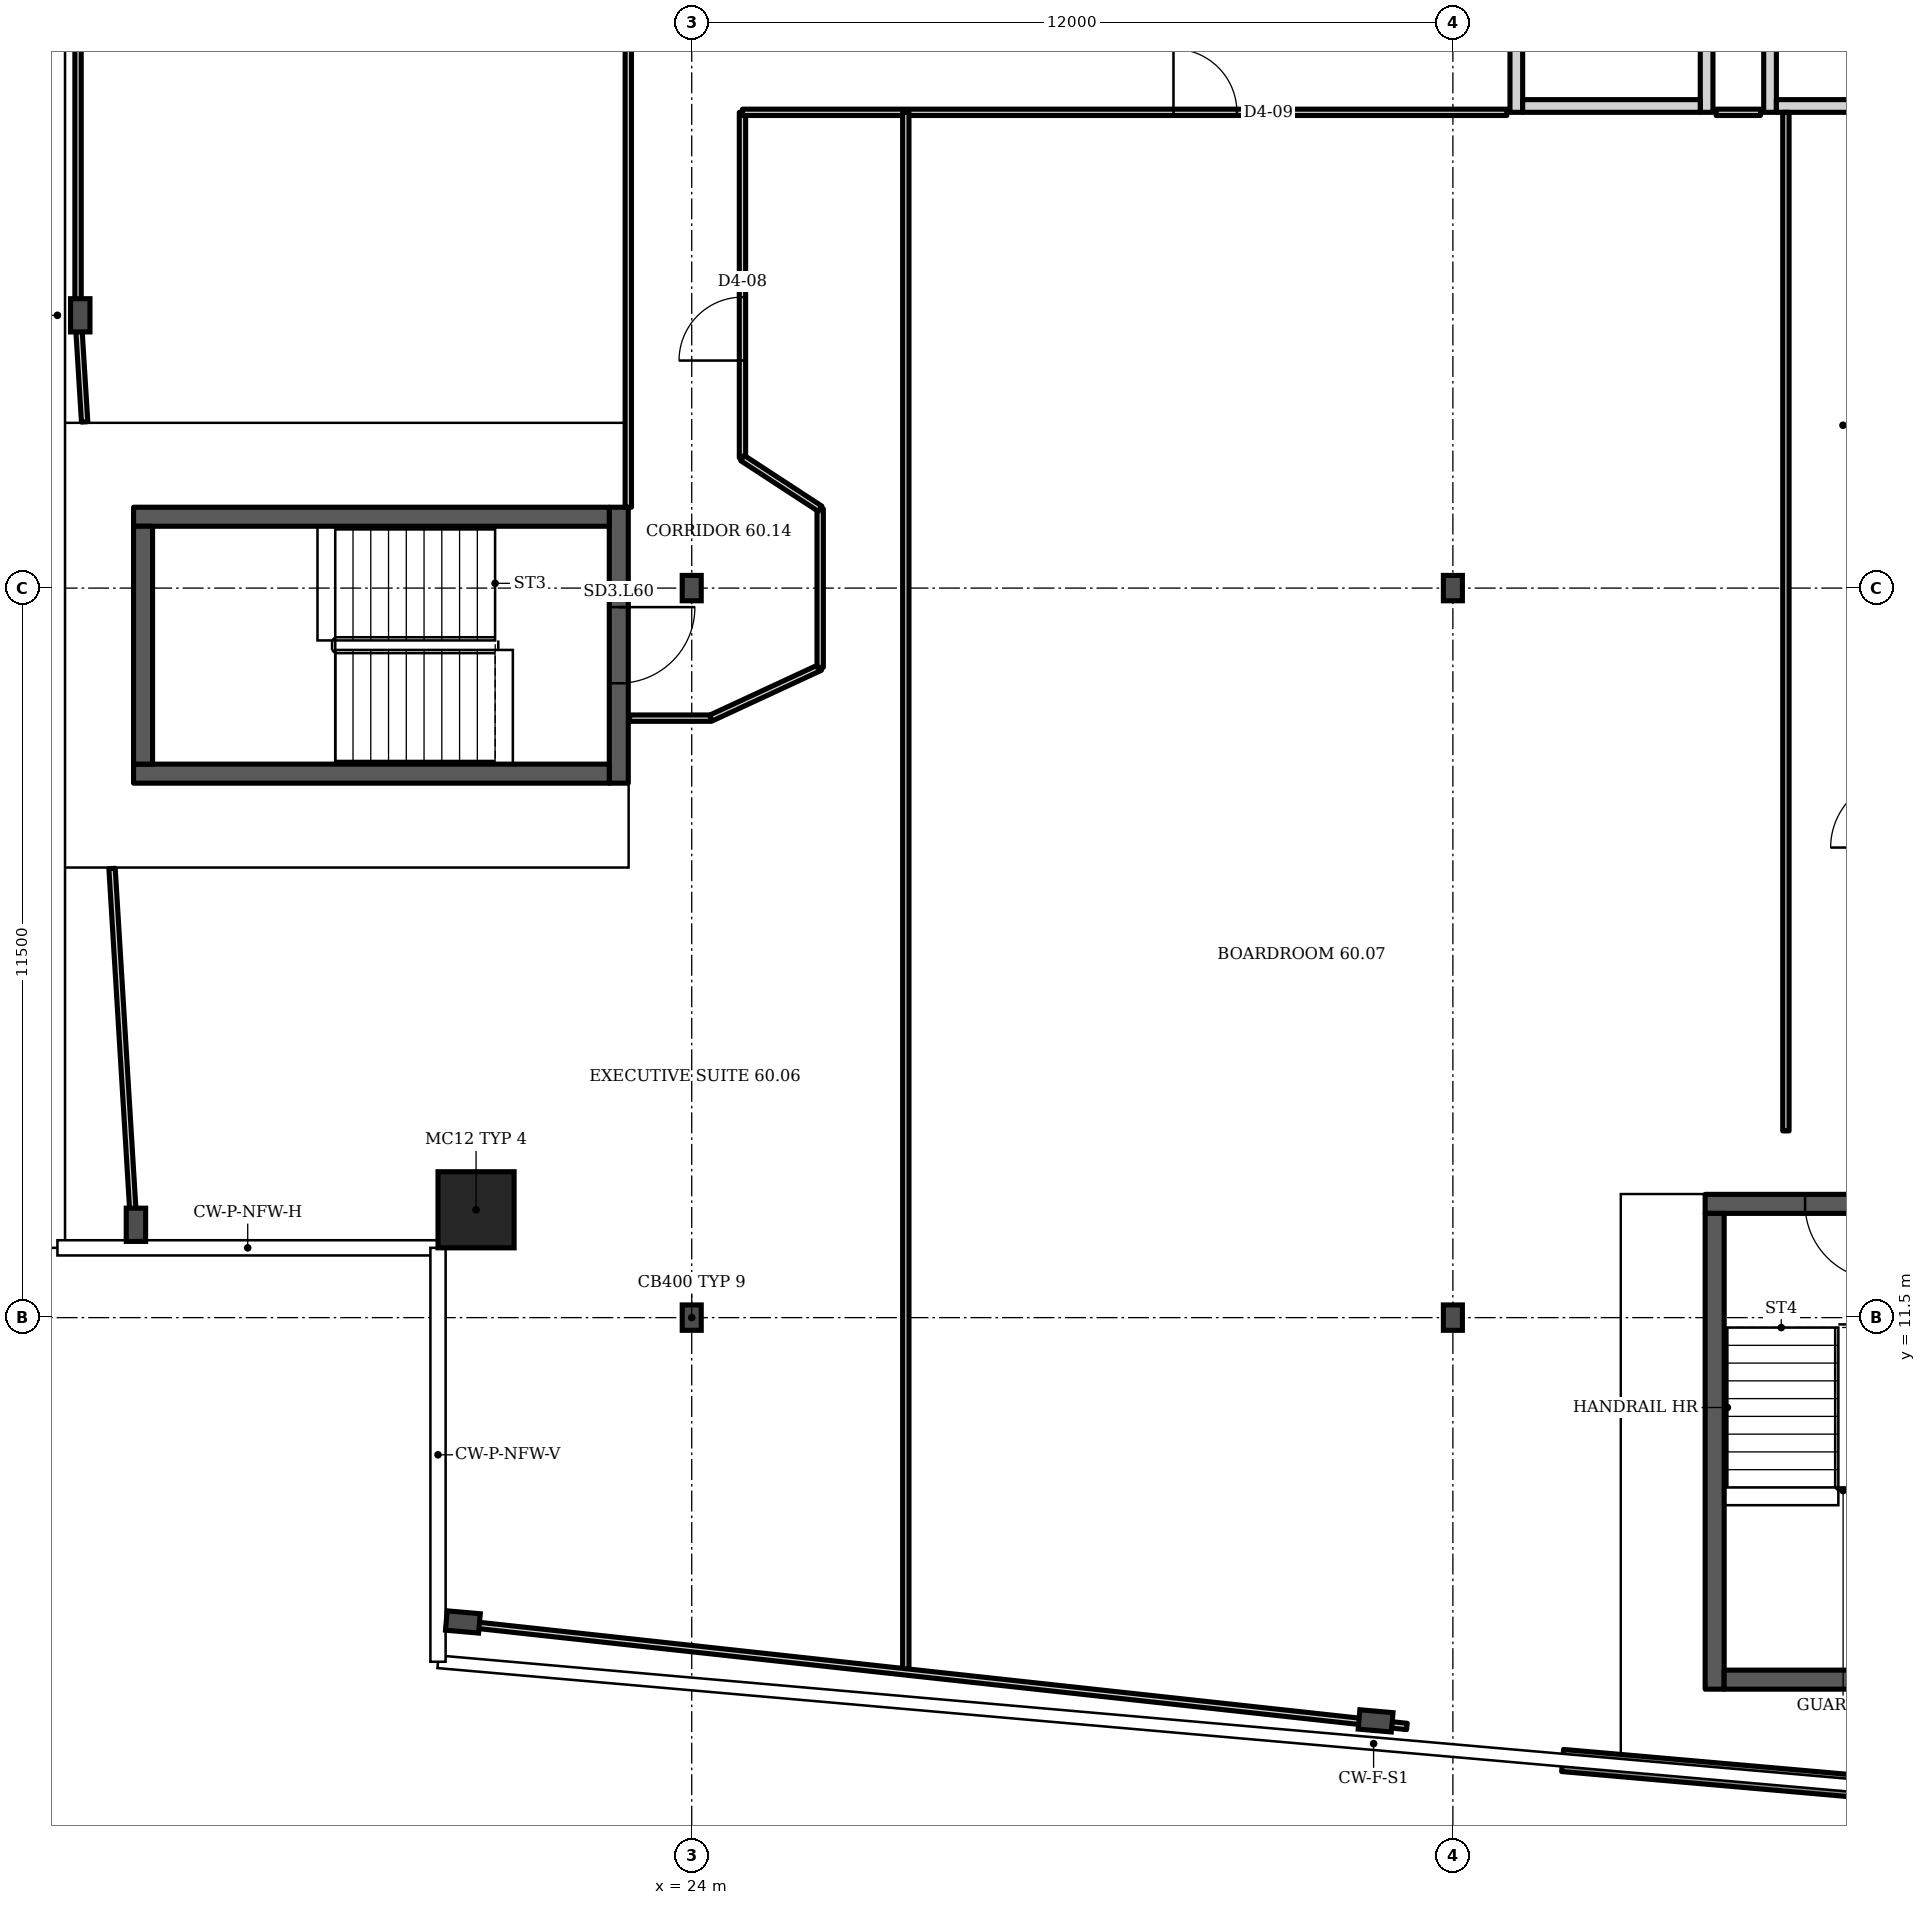
"""IFC4 building model, lengths in metres.
Left out: names, types, materials, properties, quantities, classifications, styles, units other than length and angle.
Written with IfcOpenShell. Run it as: python <this file> out.ifc"""

import sys

from ifc_helpers import new_model, si_unit, direction, frame, frame_2d, origin, origin_2d, place, context, subcontext, project, spatial, rectangle, i_section, extrude, element, fill, save


model = new_model("IFC4")
c1 = context("Model", 3, precision=1e-05, world=origin(), true_north=direction((0.0, 1.0)))
c2 = subcontext(c1, "Body", "Model", "MODEL_VIEW")
j1 = project(units=[si_unit("LENGTHUNIT", "METRE"), si_unit("PLANEANGLEUNIT", "RADIAN")], contexts=[c1])
p1 = place(None, origin())
s1 = spatial("IfcSite", under=j1, at=p1, CompositionType="ELEMENT")
p2 = place(p1, origin())
s2 = spatial("IfcBuilding", under=s1, at=p2, CompositionType="ELEMENT")
p3 = place(p2, frame((0.0, 0.0, 239.5)))
s3 = spatial("IfcBuildingStorey", under=s2, at=p3, CompositionType="ELEMENT", Elevation=239.5)
p4 = place(p3, frame((20.6, 13.2, 0.0), z_axis=(0.0, 0.0, 1.0), x_axis=(1.0, 0.0, 0.0)))
e1 = element("IfcColumn", 1, at=p4, inside=s3, PredefinedType="COLUMN", context=c2, shape_type="SweptSolid", body=[
    extrude(rectangle(XDim=1.2, YDim=1.2, at=origin_2d()), origin(), (0.0, 0.0, 1.0), 3.6),
])
for number, where, z_axis, x_axis in (
    (2, (20.392, 6.703, 0.0), (0.0, 0.0, 1.0), (-0.087, -0.996, 0.0)),
    (3, (34.781, 5.143, 0.0), (0.0, 0.0, 1.0), (-0.087, -0.996, 0.0)),
    (4, (14.36, 27.3, 0.0), (0.0, 0.0, 1.0), (-1.0, 0.0, 0.0)),
    (5, (15.238, 12.963, 0.0), (0.0, 0.0, 1.0), (-1.0, 0.0, 0.0)),
):
    element("IfcColumn", number, at=place(p3, frame(where, z_axis=z_axis, x_axis=x_axis)), inside=s3, PredefinedType="COLUMN", context=c2, shape_type="SweptSolid", body=[
        extrude(i_section(OverallWidth=0.306, OverallDepth=0.524, WebThickness=0.021, FlangeThickness=0.04, FilletRadius=0.027, at=origin_2d()), origin(), (0.0, 0.0, 1.0), 3.6),
    ])
for number, where, z_axis, x_axis in (
    (6, (24.0, 11.5, 0.0), (0.0, 0.0, 1.0), (1.0, 0.0, 0.0)),
    (7, (36.0, 11.5, 0.0), (0.0, 0.0, 1.0), (1.0, 0.0, 0.0)),
    (8, (24.0, 23.0, 0.0), (0.0, 0.0, 1.0), (1.0, 0.0, 0.0)),
    (9, (36.0, 23.0, 0.0), (0.0, 0.0, 1.0), (1.0, 0.0, 0.0)),
):
    element("IfcColumn", number, at=place(p3, frame(where, z_axis=z_axis, x_axis=x_axis)), inside=s3, PredefinedType="COLUMN", context=c2, shape_type="SweptSolid", body=[
        extrude(i_section(OverallWidth=0.3, OverallDepth=0.4, WebThickness=0.013, FlangeThickness=0.024, FilletRadius=0.027, at=origin_2d()), origin(), (0.0, 0.0, 1.0), 3.6),
    ])
p5 = place(p3, frame((37.729, 4.519, 0.0), z_axis=(0.0, 0.0, 1.0), x_axis=(0.99619, -0.087167, 0.0)))
e10 = element("IfcWall", 10, at=p5, inside=s3, PredefinedType="SOLIDWALL", context=c2, shape_type="SweptSolid", body=[
    extrude(rectangle(XDim=11.831, YDim=0.35, at=frame_2d((5.915, 0.0))), origin(), (0.0, 0.0, 1.0), 1.0),
])
p6 = place(p3, frame((37.0, 30.5, 0.0), z_axis=(0.0, 0.0, 1.0), x_axis=(0.0, 1.0, 0.0)))
e11 = element("IfcWall", 11, at=p6, inside=s3, PredefinedType="PARTITIONING", context=c2, shape_type="SweptSolid", body=[
    extrude(rectangle(XDim=3.5, YDim=0.2, at=frame_2d((1.75, 0.0))), origin(), (0.0, 0.0, 1.0), 3.2),
])
p7 = place(p6, frame((1.2, 0.0, 0.0)))
e12 = element("IfcOpeningElement", 12, at=p7, cuts=e11, PredefinedType="OPENING", context=c2, shape_type="SweptSolid", body=[
    extrude(rectangle(XDim=1.1, YDim=2.1, at=frame_2d((0.55, 1.05))), frame((0.0, 0.11, 0.0), z_axis=(0.0, -1.0, 0.0), x_axis=(1.0, 0.0, 0.0)), (0.0, 0.0, 1.0), 0.22),
])
p8 = place(p3, frame((40.0, 30.5, 0.0), z_axis=(0.0, 0.0, 1.0), x_axis=(0.0, 1.0, 0.0)))
e13 = element("IfcWall", 13, at=p8, inside=s3, PredefinedType="PARTITIONING", context=c2, shape_type="SweptSolid", body=[
    extrude(rectangle(XDim=3.5, YDim=0.2, at=frame_2d((1.75, 0.0))), origin(), (0.0, 0.0, 1.0), 3.2),
])
p9 = place(p3, frame((37.1, 30.6, 0.0), z_axis=(0.0, 0.0, 1.0), x_axis=(1.0, 0.0, 0.0)))
e14 = element("IfcWall", 14, at=p9, inside=s3, PredefinedType="PARTITIONING", context=c2, shape_type="SweptSolid", body=[
    extrude(rectangle(XDim=2.8, YDim=0.2, at=frame_2d((1.4, 0.0))), origin(), (0.0, 0.0, 1.0), 3.2),
])
p10 = place(p3, frame((41.0, 30.5, 0.0), z_axis=(0.0, 0.0, 1.0), x_axis=(0.0, 1.0, 0.0)))
e15 = element("IfcWall", 15, at=p10, inside=s3, PredefinedType="PARTITIONING", context=c2, shape_type="SweptSolid", body=[
    extrude(rectangle(XDim=3.5, YDim=0.2, at=frame_2d((1.75, 0.0))), origin(), (0.0, 0.0, 1.0), 3.2),
])
p11 = place(p3, frame((41.1, 30.6, 0.0), z_axis=(0.0, 0.0, 1.0), x_axis=(1.0, 0.0, 0.0)))
e16 = element("IfcWall", 16, at=p11, inside=s3, PredefinedType="PARTITIONING", context=c2, shape_type="SweptSolid", body=[
    extrude(rectangle(XDim=2.8, YDim=0.2, at=frame_2d((1.4, 0.0))), origin(), (0.0, 0.0, 1.0), 3.2),
])
p12 = place(p3, frame((22.85, 19.925, 0.0), z_axis=(0.0, 0.0, 1.0), x_axis=(0.0, 1.0, 0.0)))
e17 = element("IfcWall", 17, at=p12, inside=s3, PredefinedType="SHEAR", context=c2, shape_type="SweptSolid", body=[
    extrude(rectangle(XDim=4.35, YDim=0.3, at=frame_2d((2.175, 0.0))), origin(), (0.0, 0.0, 1.0), 3.2),
])
p13 = place(p12, frame((1.575, 0.0, 0.0)))
e18 = element("IfcOpeningElement", 18, at=p13, cuts=e17, PredefinedType="OPENING", context=c2, shape_type="SweptSolid", body=[
    extrude(rectangle(XDim=1.2, YDim=2.1, at=frame_2d((0.6, 1.05))), frame((0.0, 0.16, 0.0), z_axis=(0.0, -1.0, 0.0), x_axis=(1.0, 0.0, 0.0)), (0.0, 0.0, 1.0), 0.32),
])
p14 = place(p3, frame((39.977, 13.293, 0.0), z_axis=(0.0, 0.0, 1.0), x_axis=(1.0, 0.0, 0.0)))
e19 = element("IfcWall", 19, at=p14, inside=s3, PredefinedType="SHEAR", context=c2, shape_type="SweptSolid", body=[
    extrude(rectangle(XDim=4.35, YDim=0.3, at=frame_2d((2.175, 0.0))), origin(), (0.0, 0.0, 1.0), 3.2),
])
p15 = place(p14, frame((1.575, 0.0, 0.0)))
e20 = element("IfcOpeningElement", 20, at=p15, cuts=e19, PredefinedType="OPENING", context=c2, shape_type="SweptSolid", body=[
    extrude(rectangle(XDim=1.2, YDim=2.1, at=frame_2d((0.6, 1.05))), frame((0.0, 0.16, 0.0), z_axis=(0.0, -1.0, 0.0), x_axis=(1.0, 0.0, 0.0)), (0.0, 0.0, 1.0), 0.32),
])
p16 = place(p3, frame((14.325, 27.3, 0.0), z_axis=(0.0, 0.0, 1.0), x_axis=(0.0, 1.0, 0.0)))
e21 = element("IfcWall", 21, at=p16, inside=s3, PredefinedType="PARTITIONING", context=c2, shape_type="SweptSolid", body=[
    extrude(rectangle(XDim=14.68, YDim=0.1, at=frame_2d((7.34, 0.0))), origin(), (0.0, 0.0, 1.0), 2.58),
])
p17 = place(p3, frame((14.429, 25.62, 0.0), z_axis=(0.0, 0.0, 1.0), x_axis=(-0.061647, 0.998101, 0.0)))
e22 = element("IfcWall", 22, at=p17, inside=s3, PredefinedType="PARTITIONING", context=c2, shape_type="SweptSolid", body=[
    extrude(rectangle(XDim=1.683, YDim=0.1, at=frame_2d((0.842, 0.0))), origin(), (0.0, 0.0, 1.0), 3.2),
])
p18 = place(p3, frame((15.224, 12.62, 0.0), z_axis=(0.0, 0.0, 1.0), x_axis=(-0.060759, 0.998149, 0.0)))
e23 = element("IfcWall", 23, at=p18, inside=s3, PredefinedType="PARTITIONING", context=c2, shape_type="SweptSolid", body=[
    extrude(rectangle(XDim=5.971, YDim=0.1, at=frame_2d((2.985, 0.0))), origin(), (0.0, 0.0, 1.0), 3.2),
])
p19 = place(p3, frame((23.0, 24.275, 0.0), z_axis=(0.0, 0.0, 1.0), x_axis=(0.0, 1.0, 0.0)))
e24 = element("IfcWall", 24, at=p19, inside=s3, PredefinedType="PARTITIONING", context=c2, shape_type="SweptSolid", body=[
    extrude(rectangle(XDim=9.705, YDim=0.1, at=frame_2d((4.853, 0.0))), origin(), (0.0, 0.0, 1.0), 3.2),
])
p20 = place(p19, frame((7.905, 0.0, 0.0)))
e25 = element("IfcOpeningElement", 25, at=p20, cuts=e24, PredefinedType="OPENING", context=c2, shape_type="SweptSolid", body=[
    extrude(rectangle(XDim=1.0, YDim=2.1, at=frame_2d((0.5, 1.05))), frame((0.0, 0.06, 0.0), z_axis=(0.0, -1.0, 0.0), x_axis=(1.0, 0.0, 0.0)), (0.0, 0.0, 1.0), 0.12),
])
p21 = place(p3, frame((23.02, 20.95, 0.0), z_axis=(0.0, 0.0, 1.0), x_axis=(1.0, 0.0, 0.0)))
e26 = element("IfcWall", 26, at=p21, inside=s3, PredefinedType="PARTITIONING", context=c2, shape_type="SweptSolid", body=[
    extrude(rectangle(XDim=1.28, YDim=0.1, at=frame_2d((0.64, 0.0))), origin(), (0.0, 0.0, 1.0), 3.2),
])
p22 = place(p3, frame((24.3, 20.95, 0.0), z_axis=(0.0, 0.0, 1.0), x_axis=(0.907168, 0.420777, 0.0)))
e27 = element("IfcWall", 27, at=p22, inside=s3, PredefinedType="PARTITIONING", context=c2, shape_type="SweptSolid", body=[
    extrude(rectangle(XDim=1.901, YDim=0.1, at=frame_2d((0.951, 0.0))), origin(), (0.0, 0.0, 1.0), 3.2),
])
p23 = place(p3, frame((24.8, 25.05, 0.0), z_axis=(0.0, 0.0, 1.0), x_axis=(0.0, 1.0, 0.0)))
e28 = element("IfcWall", 28, at=p23, inside=s3, PredefinedType="PARTITIONING", context=c2, shape_type="SweptSolid", body=[
    extrude(rectangle(XDim=5.45, YDim=0.1, at=frame_2d((2.725, 0.0))), origin(), (0.0, 0.0, 1.0), 3.2),
])
p24 = place(p23, frame((1.537, 0.0, 0.0)))
e29 = element("IfcOpeningElement", 29, at=p24, cuts=e28, PredefinedType="OPENING", context=c2, shape_type="SweptSolid", body=[
    extrude(rectangle(XDim=1.0, YDim=2.1, at=frame_2d((0.5, 1.05))), frame((0.0, 0.06, 0.0), z_axis=(0.0, -1.0, 0.0), x_axis=(1.0, 0.0, 0.0)), (0.0, 0.0, 1.0), 0.12),
])
p25 = place(p3, frame((24.8, 30.5, 0.0), z_axis=(0.0, 0.0, 1.0), x_axis=(1.0, 0.0, 0.0)))
e30 = element("IfcWall", 30, at=p25, inside=s3, PredefinedType="PARTITIONING", context=c2, shape_type="SweptSolid", body=[
    extrude(rectangle(XDim=12.05, YDim=0.1, at=frame_2d((6.025, 0.0))), origin(), (0.0, 0.0, 1.0), 3.2),
])
p26 = place(p25, frame((6.795, 0.0, 0.0)))
e31 = element("IfcOpeningElement", 31, at=p26, cuts=e30, PredefinedType="OPENING", context=c2, shape_type="SweptSolid", body=[
    extrude(rectangle(XDim=1.0, YDim=2.1, at=frame_2d((0.5, 1.05))), frame((0.0, 0.06, 0.0), z_axis=(0.0, -1.0, 0.0), x_axis=(1.0, 0.0, 0.0)), (0.0, 0.0, 1.0), 0.12),
])
p27 = place(p3, frame((26.025, 21.75, 0.0), z_axis=(0.0, 0.0, 1.0), x_axis=(0.0, 1.0, 0.0)))
e32 = element("IfcWall", 32, at=p27, inside=s3, PredefinedType="PARTITIONING", context=c2, shape_type="SweptSolid", body=[
    extrude(rectangle(XDim=2.5, YDim=0.1, at=frame_2d((1.25, 0.0))), origin(), (0.0, 0.0, 1.0), 3.2),
])
p28 = place(p3, frame((26.025, 24.25, 0.0), z_axis=(0.0, 0.0, 1.0), x_axis=(-0.837222, 0.546856, 0.0)))
e33 = element("IfcWall", 33, at=p28, inside=s3, PredefinedType="PARTITIONING", context=c2, shape_type="SweptSolid", body=[
    extrude(rectangle(XDim=1.463, YDim=0.1, at=frame_2d((0.731, 0.0))), origin(), (0.0, 0.0, 1.0), 3.2),
])
p29 = place(p3, frame((27.375, 5.915, 0.0), z_axis=(0.0, 0.0, 1.0), x_axis=(0.0, 1.0, 0.0)))
e34 = element("IfcWall", 34, at=p29, inside=s3, PredefinedType="PARTITIONING", context=c2, shape_type="SweptSolid", body=[
    extrude(rectangle(XDim=24.585, YDim=0.1, at=frame_2d((12.292, 0.0))), origin(), (0.0, 0.0, 1.0), 3.2),
])
p30 = place(p3, frame((35.275, 5.055, 0.0), z_axis=(0.0, 0.0, 1.0), x_axis=(-0.994128, 0.108228, 0.0)))
e35 = element("IfcWall", 35, at=p30, inside=s3, PredefinedType="PARTITIONING", context=c2, shape_type="SweptSolid", body=[
    extrude(rectangle(XDim=15.335, YDim=0.1, at=frame_2d((7.667, 0.0))), origin(), (0.0, 0.0, 1.0), 2.58),
])
p31 = place(p3, frame((41.25, 14.443, 0.0), z_axis=(0.0, 0.0, 1.0), x_axis=(0.0, 1.0, 0.0)))
e36 = element("IfcWall", 36, at=p31, inside=s3, PredefinedType="PARTITIONING", context=c2, shape_type="SweptSolid", body=[
    extrude(rectangle(XDim=16.057, YDim=0.1, at=frame_2d((8.028, 0.0))), origin(), (0.0, 0.0, 1.0), 3.2),
])
p32 = place(p3, frame((40.15, 30.5, 0.0), z_axis=(0.0, 0.0, 1.0), x_axis=(1.0, 0.0, 0.0)))
e37 = element("IfcWall", 37, at=p32, inside=s3, PredefinedType="PARTITIONING", context=c2, shape_type="SweptSolid", body=[
    extrude(rectangle(XDim=0.7, YDim=0.1, at=frame_2d((0.35, 0.0))), origin(), (0.0, 0.0, 1.0), 3.2),
])
for number, where, z_axis, x_axis in (
    (38, (15.2, 20.075, 0.0), (0.0, 0.0, 1.0), (1.0, 0.0, 0.0)),
    (39, (15.2, 24.125, 0.0), (0.0, 0.0, 1.0), (1.0, 0.0, 0.0)),
):
    element("IfcWall", number, at=place(p3, frame(where, z_axis=z_axis, x_axis=x_axis)), inside=s3, PredefinedType="SHEAR", context=c2, shape_type="SweptSolid", body=[
        extrude(rectangle(XDim=7.5, YDim=0.3, at=frame_2d((3.75, 0.0))), origin(), (0.0, 0.0, 1.0), 3.2),
    ])
p33 = place(p3, frame((15.35, 20.225, 0.0), z_axis=(0.0, 0.0, 1.0), x_axis=(0.0, 1.0, 0.0)))
e40 = element("IfcWall", 40, at=p33, inside=s3, PredefinedType="SHEAR", context=c2, shape_type="SweptSolid", body=[
    extrude(rectangle(XDim=3.75, YDim=0.3, at=frame_2d((1.875, 0.0))), origin(), (0.0, 0.0, 1.0), 3.2),
])
p34 = place(p3, frame((40.127, 5.643, 0.0), z_axis=(0.0, 0.0, 1.0), x_axis=(0.0, 1.0, 0.0)))
e41 = element("IfcWall", 41, at=p34, inside=s3, PredefinedType="SHEAR", context=c2, shape_type="SweptSolid", body=[
    extrude(rectangle(XDim=7.5, YDim=0.3, at=frame_2d((3.75, 0.0))), origin(), (0.0, 0.0, 1.0), 3.2),
])
p35 = place(p3, frame((40.277, 5.793, 0.0), z_axis=(0.0, 0.0, 1.0), x_axis=(1.0, 0.0, 0.0)))
e42 = element("IfcWall", 42, at=p35, inside=s3, PredefinedType="SHEAR", context=c2, shape_type="SweptSolid", body=[
    extrude(rectangle(XDim=3.75, YDim=0.3, at=frame_2d((1.875, 0.0))), origin(), (0.0, 0.0, 1.0), 3.2),
])
p36 = place(p13, origin())
e43 = element("IfcDoor", 43, at=p36, inside=s3, OperationType="SINGLE_SWING_RIGHT", PredefinedType="DOOR", context=c2, shape_type="SweptSolid", body=[
    extrude(rectangle(XDim=1.2, YDim=2.1, at=frame_2d((0.6, 1.05))), frame((0.0, 0.025, 0.0), z_axis=(0.0, -1.0, 0.0), x_axis=(1.0, 0.0, 0.0)), (0.0, 0.0, 1.0), 0.05),
])
fill(e18, e43)
p37 = place(p15, origin())
e44 = element("IfcDoor", 44, at=p37, inside=s3, OperationType="SINGLE_SWING_RIGHT", PredefinedType="DOOR", context=c2, shape_type="SweptSolid", body=[
    extrude(rectangle(XDim=1.2, YDim=2.1, at=frame_2d((0.6, 1.05))), frame((0.0, 0.025, 0.0), z_axis=(0.0, -1.0, 0.0), x_axis=(1.0, 0.0, 0.0)), (0.0, 0.0, 1.0), 0.05),
])
fill(e20, e44)
p38 = place(p24, origin())
e45 = element("IfcDoor", 45, at=p38, inside=s3, OperationType="SINGLE_SWING_LEFT", PredefinedType="DOOR", context=c2, shape_type="SweptSolid", body=[
    extrude(rectangle(XDim=1.0, YDim=2.1, at=frame_2d((0.5, 1.05))), frame((0.0, 0.025, 0.0), z_axis=(0.0, -1.0, 0.0), x_axis=(1.0, 0.0, 0.0)), (0.0, 0.0, 1.0), 0.05),
])
fill(e29, e45)
p39 = place(p26, origin())
e46 = element("IfcDoor", 46, at=p39, inside=s3, OperationType="SINGLE_SWING_LEFT", PredefinedType="DOOR", context=c2, shape_type="SweptSolid", body=[
    extrude(rectangle(XDim=1.0, YDim=2.1, at=frame_2d((0.5, 1.05))), frame((0.0, 0.025, 0.0), z_axis=(0.0, -1.0, 0.0), x_axis=(1.0, 0.0, 0.0)), (0.0, 0.0, 1.0), 0.05),
])
fill(e31, e46)
save(model, sys.argv[1])
